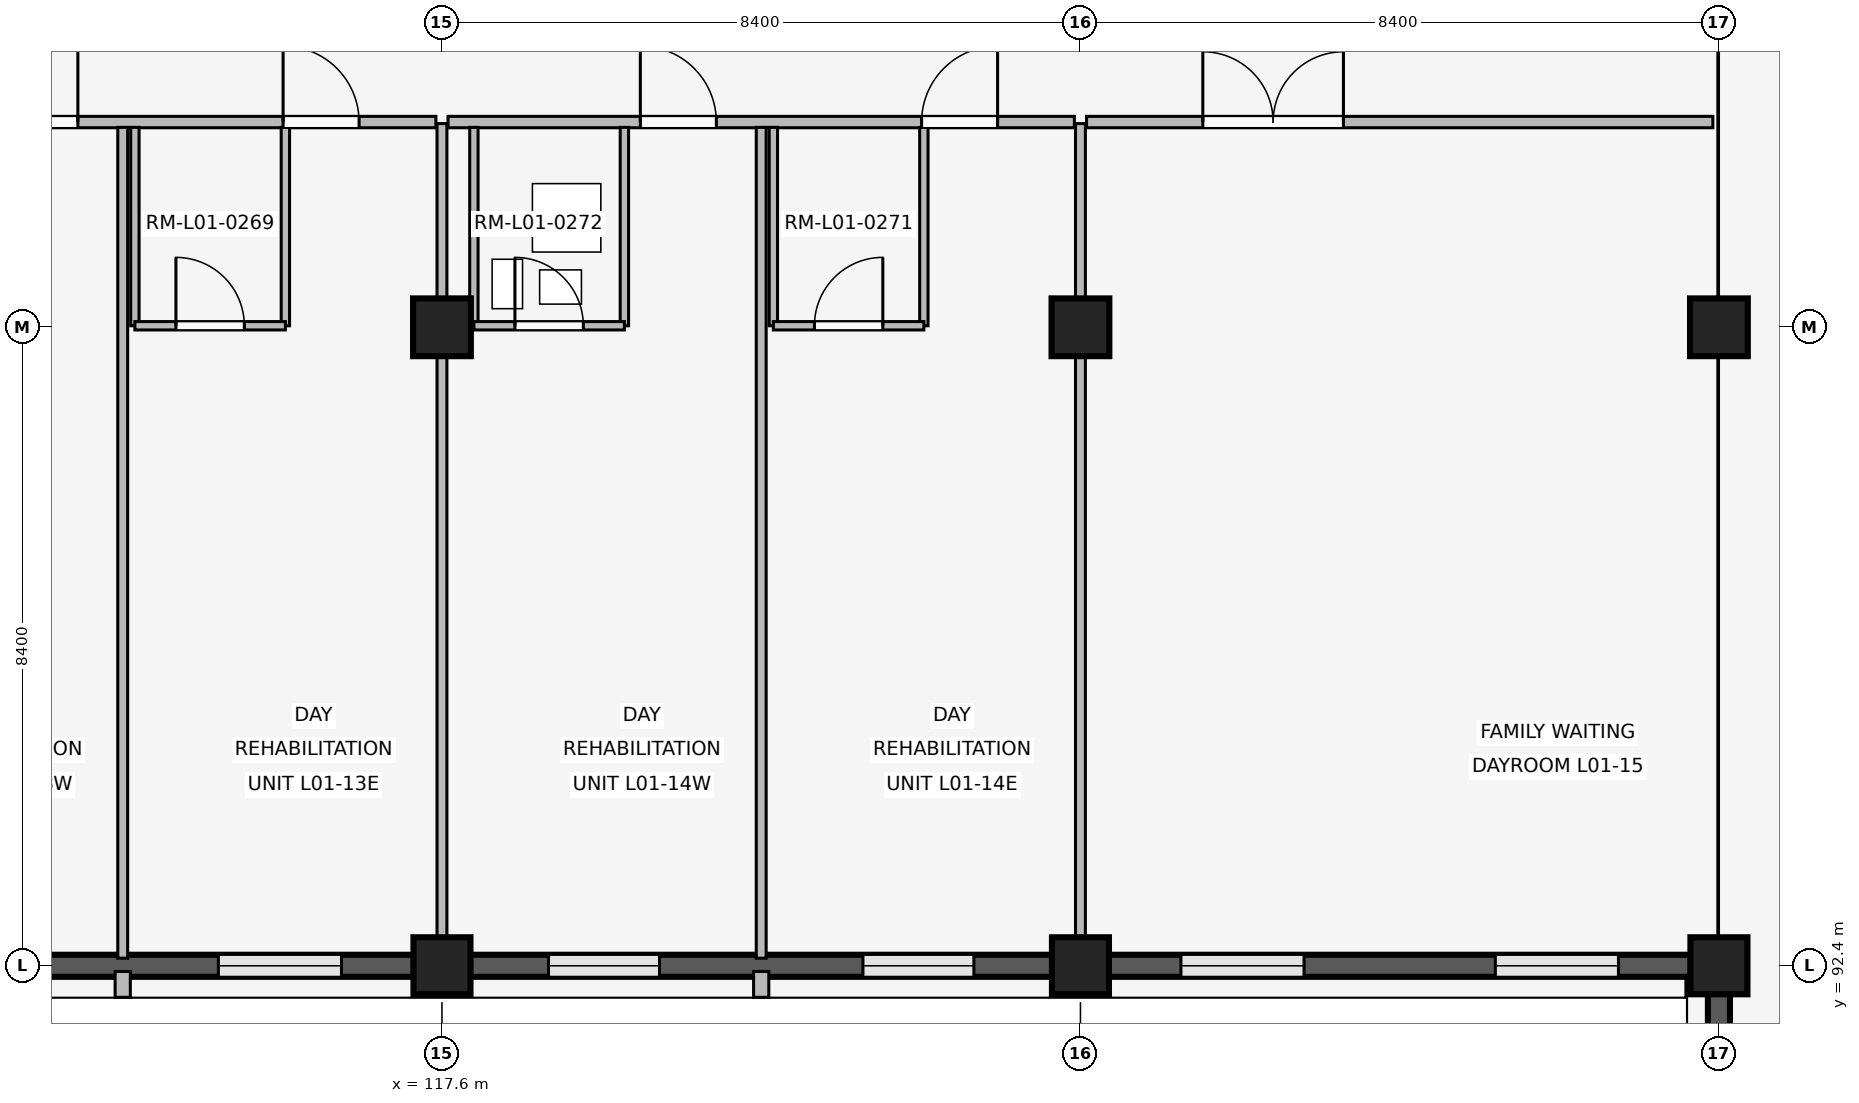
"""IFC4 building model, lengths in metres.
Left out: names, types, materials, properties, quantities, classifications, styles, units other than length and angle.
Written with IfcOpenShell. Run it as: python <this file> out.ifc"""

import sys

from ifc_helpers import new_model, si_unit, direction, frame, frame_2d, origin, origin_2d, place, context, subcontext, project, spatial, rectangle, extrude, element, fill, save


model = new_model("IFC4")
c1 = context("Model", 3, precision=1e-05, world=origin(), true_north=direction((0.0, 1.0)))
c2 = subcontext(c1, "Body", "Model", "MODEL_VIEW")
j1 = project(units=[si_unit("LENGTHUNIT", "METRE"), si_unit("PLANEANGLEUNIT", "RADIAN")], contexts=[c1])
p1 = place(None, origin())
s1 = spatial("IfcSite", under=j1, at=p1, CompositionType="ELEMENT")
p2 = place(p1, origin())
s2 = spatial("IfcBuilding", under=s1, at=p2, CompositionType="ELEMENT")
p3 = place(p2, frame((0.0, 0.0, 4.8)))
s3 = spatial("IfcBuildingStorey", under=s2, at=p3, CompositionType="ELEMENT", Elevation=4.8)
p4 = place(p3, frame((117.6, 92.4, 0.0), z_axis=(0.0, 0.0, 1.0), x_axis=(1.0, 0.0, 0.0)))
e1 = element("IfcColumn", 1, at=p4, inside=s3, PredefinedType="COLUMN", context=c2, shape_type="SweptSolid", body=[
    extrude(rectangle(XDim=0.75, YDim=0.75, at=origin_2d()), origin(), (0.0, 0.0, 1.0), 3.3),
])
p5 = place(p3, frame((117.6, 100.8, 0.0), z_axis=(0.0, 0.0, 1.0), x_axis=(1.0, 0.0, 0.0)))
e2 = element("IfcColumn", 2, at=p5, inside=s3, PredefinedType="COLUMN", context=c2, shape_type="SweptSolid", body=[
    extrude(rectangle(XDim=0.76, YDim=0.76, at=origin_2d()), origin(), (0.0, 0.0, 1.0), 3.3),
])
p6 = place(p3, frame((126.0, 92.4, 0.0), z_axis=(0.0, 0.0, 1.0), x_axis=(1.0, 0.0, 0.0)))
e3 = element("IfcColumn", 3, at=p6, inside=s3, PredefinedType="COLUMN", context=c2, shape_type="SweptSolid", body=[
    extrude(rectangle(XDim=0.75, YDim=0.75, at=origin_2d()), origin(), (0.0, 0.0, 1.0), 3.3),
])
p7 = place(p3, frame((126.0, 100.8, 0.0), z_axis=(0.0, 0.0, 1.0), x_axis=(1.0, 0.0, 0.0)))
e4 = element("IfcColumn", 4, at=p7, inside=s3, PredefinedType="COLUMN", context=c2, shape_type="SweptSolid", body=[
    extrude(rectangle(XDim=0.76, YDim=0.76, at=origin_2d()), origin(), (0.0, 0.0, 1.0), 3.3),
])
p8 = place(p3, frame((134.4, 92.4, 0.0), z_axis=(0.0, 0.0, 1.0), x_axis=(1.0, 0.0, 0.0)))
e5 = element("IfcColumn", 5, at=p8, inside=s3, PredefinedType="COLUMN", context=c2, shape_type="SweptSolid", body=[
    extrude(rectangle(XDim=0.75, YDim=0.75, at=origin_2d()), origin(), (0.0, 0.0, 1.0), 3.3),
])
p9 = place(p3, frame((134.4, 100.8, 0.0), z_axis=(0.0, 0.0, 1.0), x_axis=(1.0, 0.0, 0.0)))
e6 = element("IfcColumn", 6, at=p9, inside=s3, PredefinedType="COLUMN", context=c2, shape_type="SweptSolid", body=[
    extrude(rectangle(XDim=0.76, YDim=0.76, at=origin_2d()), origin(), (0.0, 0.0, 1.0), 3.3),
])
p10 = place(p3, frame((117.23, 92.4, 0.0), z_axis=(0.0, 0.0, 1.0), x_axis=(-1.0, 0.0, 0.0)))
e7 = element("IfcWall", 7, at=p10, inside=s3, PredefinedType="SOLIDWALL", context=c2, shape_type="SweptSolid", body=[
    extrude(rectangle(XDim=7.66, YDim=0.29, at=frame_2d((3.83, 0.0))), origin(), (0.0, 0.0, 1.0), 2.42),
])
p11 = place(p10, frame((0.952, 0.0, 0.85)))
e8 = element("IfcOpeningElement", 8, at=p11, cuts=e7, PredefinedType="OPENING", context=c2, shape_type="SweptSolid", body=[
    extrude(rectangle(XDim=1.62, YDim=0.95, at=frame_2d((0.81, 0.475))), frame((0.0, 0.155, 0.0), z_axis=(0.0, -1.0, 0.0), x_axis=(1.0, 0.0, 0.0)), (0.0, 0.0, 1.0), 0.31),
])
p12 = place(p10, frame((5.088, 0.0, 0.85)))
e9 = element("IfcOpeningElement", 9, at=p12, cuts=e7, PredefinedType="OPENING", context=c2, shape_type="SweptSolid", body=[
    extrude(rectangle(XDim=1.62, YDim=0.95, at=frame_2d((0.81, 0.475))), frame((0.0, 0.155, 0.0), z_axis=(0.0, -1.0, 0.0), x_axis=(1.0, 0.0, 0.0)), (0.0, 0.0, 1.0), 0.31),
])
p13 = place(p3, frame((113.4, 92.325, 0.0), z_axis=(0.0, 0.0, 1.0), x_axis=(0.0, -1.0, 0.0)))
e10 = element("IfcWall", 10, at=p13, inside=s3, PredefinedType="ELEMENTEDWALL", context=c2, shape_type="SweptSolid", body=[
    extrude(rectangle(XDim=0.34, YDim=0.2, at=frame_2d((0.17, 0.0))), origin(), (0.0, 0.0, 1.0), 2.4),
])
p14 = place(p3, frame((125.63, 92.4, 0.0), z_axis=(0.0, 0.0, 1.0), x_axis=(-1.0, 0.0, 0.0)))
e11 = element("IfcWall", 11, at=p14, inside=s3, PredefinedType="SOLIDWALL", context=c2, shape_type="SweptSolid", body=[
    extrude(rectangle(XDim=7.66, YDim=0.29, at=frame_2d((3.83, 0.0))), origin(), (0.0, 0.0, 1.0), 2.42),
])
p15 = place(p14, frame((1.032, 0.0, 0.85)))
e12 = element("IfcOpeningElement", 12, at=p15, cuts=e11, PredefinedType="OPENING", context=c2, shape_type="SweptSolid", body=[
    extrude(rectangle(XDim=1.46, YDim=0.85, at=frame_2d((0.73, 0.425))), frame((0.0, 0.155, 0.0), z_axis=(0.0, -1.0, 0.0), x_axis=(1.0, 0.0, 0.0)), (0.0, 0.0, 1.0), 0.31),
])
p16 = place(p14, frame((5.168, 0.0, 0.85)))
e13 = element("IfcOpeningElement", 13, at=p16, cuts=e11, PredefinedType="OPENING", context=c2, shape_type="SweptSolid", body=[
    extrude(rectangle(XDim=1.46, YDim=0.85, at=frame_2d((0.73, 0.425))), frame((0.0, 0.155, 0.0), z_axis=(0.0, -1.0, 0.0), x_axis=(1.0, 0.0, 0.0)), (0.0, 0.0, 1.0), 0.31),
])
p17 = place(p3, frame((121.8, 92.325, 0.0), z_axis=(0.0, 0.0, 1.0), x_axis=(0.0, -1.0, 0.0)))
e14 = element("IfcWall", 14, at=p17, inside=s3, PredefinedType="ELEMENTEDWALL", context=c2, shape_type="SweptSolid", body=[
    extrude(rectangle(XDim=0.34, YDim=0.2, at=frame_2d((0.17, 0.0))), origin(), (0.0, 0.0, 1.0), 2.4),
])
p18 = place(p3, frame((134.03, 92.4, 0.0), z_axis=(0.0, 0.0, 1.0), x_axis=(-1.0, 0.0, 0.0)))
e15 = element("IfcWall", 15, at=p18, inside=s3, PredefinedType="SOLIDWALL", context=c2, shape_type="SweptSolid", body=[
    extrude(rectangle(XDim=7.66, YDim=0.29, at=frame_2d((3.83, 0.0))), origin(), (0.0, 0.0, 1.0), 2.42),
])
p19 = place(p18, frame((0.952, 0.0, 0.85)))
e16 = element("IfcOpeningElement", 16, at=p19, cuts=e15, PredefinedType="OPENING", context=c2, shape_type="SweptSolid", body=[
    extrude(rectangle(XDim=1.62, YDim=0.95, at=frame_2d((0.81, 0.475))), frame((0.0, 0.155, 0.0), z_axis=(0.0, -1.0, 0.0), x_axis=(1.0, 0.0, 0.0)), (0.0, 0.0, 1.0), 0.31),
])
p20 = place(p18, frame((5.088, 0.0, 0.85)))
e17 = element("IfcOpeningElement", 17, at=p20, cuts=e15, PredefinedType="OPENING", context=c2, shape_type="SweptSolid", body=[
    extrude(rectangle(XDim=1.62, YDim=0.95, at=frame_2d((0.81, 0.475))), frame((0.0, 0.155, 0.0), z_axis=(0.0, -1.0, 0.0), x_axis=(1.0, 0.0, 0.0)), (0.0, 0.0, 1.0), 0.31),
])
p21 = place(p3, frame((134.4, 84.37, 0.0), z_axis=(0.0, 0.0, 1.0), x_axis=(0.0, 1.0, 0.0)))
e18 = element("IfcWall", 18, at=p21, inside=s3, PredefinedType="SOLIDWALL", context=c2, shape_type="SweptSolid", body=[
    extrude(rectangle(XDim=7.66, YDim=0.29, at=frame_2d((3.83, 0.0))), origin(), (0.0, 0.0, 1.0), 2.42),
])
p22 = place(p21, frame((1.088, 0.0, 1.05)))
e19 = element("IfcOpeningElement", 19, at=p22, cuts=e18, PredefinedType="OPENING", context=c2, shape_type="SweptSolid", body=[
    extrude(rectangle(XDim=1.5, YDim=0.75, at=frame_2d((0.75, 0.375))), frame((0.0, 0.155, 0.0), z_axis=(0.0, -1.0, 0.0), x_axis=(1.0, 0.0, 0.0)), (0.0, 0.0, 1.0), 0.31),
])
p23 = place(p21, frame((5.072, 0.0, 1.05)))
e20 = element("IfcOpeningElement", 20, at=p23, cuts=e18, PredefinedType="OPENING", context=c2, shape_type="SweptSolid", body=[
    extrude(rectangle(XDim=1.5, YDim=0.75, at=frame_2d((0.75, 0.375))), frame((0.0, 0.155, 0.0), z_axis=(0.0, -1.0, 0.0), x_axis=(1.0, 0.0, 0.0)), (0.0, 0.0, 1.0), 0.31),
])
p24 = place(p3, frame((109.28, 103.5, 0.0), z_axis=(0.0, 0.0, 1.0), x_axis=(1.0, 0.0, 0.0)))
e21 = element("IfcWall", 21, at=p24, inside=s3, PredefinedType="PARTITIONING", context=c2, shape_type="SweptSolid", body=[
    extrude(rectangle(XDim=8.24, YDim=0.15, at=frame_2d((4.12, 0.0))), origin(), (0.0, 0.0, 1.0), 2.4),
])
p25 = place(p24, frame((2.53, 0.0, 0.0)))
e22 = element("IfcOpeningElement", 22, at=p25, cuts=e21, PredefinedType="OPENING", context=c2, shape_type="SweptSolid", body=[
    extrude(rectangle(XDim=1.0, YDim=2.15, at=frame_2d((0.5, 1.075))), frame((0.0, 0.085, 0.0), z_axis=(0.0, -1.0, 0.0), x_axis=(1.0, 0.0, 0.0)), (0.0, 0.0, 1.0), 0.17),
])
p26 = place(p24, frame((6.23, 0.0, 0.0)))
e23 = element("IfcOpeningElement", 23, at=p26, cuts=e21, PredefinedType="OPENING", context=c2, shape_type="SweptSolid", body=[
    extrude(rectangle(XDim=1.0, YDim=2.15, at=frame_2d((0.5, 1.075))), frame((0.0, 0.085, 0.0), z_axis=(0.0, -1.0, 0.0), x_axis=(1.0, 0.0, 0.0)), (0.0, 0.0, 1.0), 0.17),
])
p27 = place(p3, frame((113.4, 92.5, 0.0), z_axis=(0.0, 0.0, 1.0), x_axis=(0.0, 1.0, 0.0)))
e24 = element("IfcWall", 24, at=p27, inside=s3, PredefinedType="PARTITIONING", context=c2, shape_type="SweptSolid", body=[
    extrude(rectangle(XDim=10.93, YDim=0.13, at=frame_2d((5.465, 0.0))), origin(), (0.0, 0.0, 1.0), 2.4),
])
for number, where, z_axis, x_axis in (
    (25, (113.56, 100.82, 0.0), (0.0, 0.0, 1.0), (0.0, 1.0, 0.0)),
    (26, (115.54, 100.82, 0.0), (0.0, 0.0, 1.0), (0.0, 1.0, 0.0)),
):
    element("IfcWall", number, at=place(p3, frame(where, z_axis=z_axis, x_axis=x_axis)), inside=s3, PredefinedType="PARTITIONING", context=c2, shape_type="SweptSolid", body=[
        extrude(rectangle(XDim=2.61, YDim=0.11, at=frame_2d((1.305, 0.0))), origin(), (0.0, 0.0, 1.0), 2.4),
    ])
p28 = place(p3, frame((113.56, 100.82, 0.0), z_axis=(0.0, 0.0, 1.0), x_axis=(1.0, 0.0, 0.0)))
e27 = element("IfcWall", 27, at=p28, inside=s3, PredefinedType="PARTITIONING", context=c2, shape_type="SweptSolid", body=[
    extrude(rectangle(XDim=1.98, YDim=0.11, at=frame_2d((0.99, 0.0))), origin(), (0.0, 0.0, 1.0), 2.4),
])
p29 = place(p28, frame((0.54, 0.0, 0.0)))
e28 = element("IfcOpeningElement", 28, at=p29, cuts=e27, PredefinedType="OPENING", context=c2, shape_type="SweptSolid", body=[
    extrude(rectangle(XDim=0.9, YDim=2.1, at=frame_2d((0.45, 1.05))), frame((0.0, 0.065, 0.0), z_axis=(0.0, -1.0, 0.0), x_axis=(1.0, 0.0, 0.0)), (0.0, 0.0, 1.0), 0.13),
])
p30 = place(p3, frame((117.6, 92.54, 0.0), z_axis=(0.0, 0.0, 1.0), x_axis=(0.0, 1.0, 0.0)))
e29 = element("IfcWall", 29, at=p30, inside=s3, PredefinedType="PARTITIONING", context=c2, shape_type="SweptSolid", body=[
    extrude(rectangle(XDim=10.94, YDim=0.13, at=frame_2d((5.47, 0.0))), origin(), (0.0, 0.0, 1.0), 2.4),
])
p31 = place(p3, frame((117.68, 103.5, 0.0), z_axis=(0.0, 0.0, 1.0), x_axis=(1.0, 0.0, 0.0)))
e30 = element("IfcWall", 30, at=p31, inside=s3, PredefinedType="PARTITIONING", context=c2, shape_type="SweptSolid", body=[
    extrude(rectangle(XDim=8.24, YDim=0.15, at=frame_2d((4.12, 0.0))), origin(), (0.0, 0.0, 1.0), 2.4),
])
p32 = place(p31, frame((2.53, 0.0, 0.0)))
e31 = element("IfcOpeningElement", 31, at=p32, cuts=e30, PredefinedType="OPENING", context=c2, shape_type="SweptSolid", body=[
    extrude(rectangle(XDim=1.0, YDim=2.15, at=frame_2d((0.5, 1.075))), frame((0.0, 0.085, 0.0), z_axis=(0.0, -1.0, 0.0), x_axis=(1.0, 0.0, 0.0)), (0.0, 0.0, 1.0), 0.17),
])
p33 = place(p31, frame((6.23, 0.0, 0.0)))
e32 = element("IfcOpeningElement", 32, at=p33, cuts=e30, PredefinedType="OPENING", context=c2, shape_type="SweptSolid", body=[
    extrude(rectangle(XDim=1.0, YDim=2.15, at=frame_2d((0.5, 1.075))), frame((0.0, 0.085, 0.0), z_axis=(0.0, -1.0, 0.0), x_axis=(1.0, 0.0, 0.0)), (0.0, 0.0, 1.0), 0.17),
])
p34 = place(p3, frame((121.8, 92.5, 0.0), z_axis=(0.0, 0.0, 1.0), x_axis=(0.0, 1.0, 0.0)))
e33 = element("IfcWall", 33, at=p34, inside=s3, PredefinedType="PARTITIONING", context=c2, shape_type="SweptSolid", body=[
    extrude(rectangle(XDim=10.93, YDim=0.13, at=frame_2d((5.465, 0.0))), origin(), (0.0, 0.0, 1.0), 2.4),
])
for number, where, z_axis, x_axis in (
    (34, (118.02, 100.82, 0.0), (0.0, 0.0, 1.0), (0.0, 1.0, 0.0)),
    (35, (120.0, 100.82, 0.0), (0.0, 0.0, 1.0), (0.0, 1.0, 0.0)),
):
    element("IfcWall", number, at=place(p3, frame(where, z_axis=z_axis, x_axis=x_axis)), inside=s3, PredefinedType="PARTITIONING", context=c2, shape_type="SweptSolid", body=[
        extrude(rectangle(XDim=2.61, YDim=0.11, at=frame_2d((1.305, 0.0))), origin(), (0.0, 0.0, 1.0), 2.4),
    ])
p35 = place(p3, frame((118.02, 100.82, 0.0), z_axis=(0.0, 0.0, 1.0), x_axis=(1.0, 0.0, 0.0)))
e36 = element("IfcWall", 36, at=p35, inside=s3, PredefinedType="PARTITIONING", context=c2, shape_type="SweptSolid", body=[
    extrude(rectangle(XDim=1.98, YDim=0.11, at=frame_2d((0.99, 0.0))), origin(), (0.0, 0.0, 1.0), 2.4),
])
p36 = place(p35, frame((0.54, 0.0, 0.0)))
e37 = element("IfcOpeningElement", 37, at=p36, cuts=e36, PredefinedType="OPENING", context=c2, shape_type="SweptSolid", body=[
    extrude(rectangle(XDim=0.9, YDim=2.1, at=frame_2d((0.45, 1.05))), frame((0.0, 0.065, 0.0), z_axis=(0.0, -1.0, 0.0), x_axis=(1.0, 0.0, 0.0)), (0.0, 0.0, 1.0), 0.13),
])
for number, where, z_axis, x_axis in (
    (38, (121.96, 100.82, 0.0), (0.0, 0.0, 1.0), (0.0, 1.0, 0.0)),
    (39, (123.94, 100.82, 0.0), (0.0, 0.0, 1.0), (0.0, 1.0, 0.0)),
):
    element("IfcWall", number, at=place(p3, frame(where, z_axis=z_axis, x_axis=x_axis)), inside=s3, PredefinedType="PARTITIONING", context=c2, shape_type="SweptSolid", body=[
        extrude(rectangle(XDim=2.61, YDim=0.11, at=frame_2d((1.305, 0.0))), origin(), (0.0, 0.0, 1.0), 2.4),
    ])
p37 = place(p3, frame((121.96, 100.82, 0.0), z_axis=(0.0, 0.0, 1.0), x_axis=(1.0, 0.0, 0.0)))
e40 = element("IfcWall", 40, at=p37, inside=s3, PredefinedType="PARTITIONING", context=c2, shape_type="SweptSolid", body=[
    extrude(rectangle(XDim=1.98, YDim=0.11, at=frame_2d((0.99, 0.0))), origin(), (0.0, 0.0, 1.0), 2.4),
])
p38 = place(p37, frame((0.54, 0.0, 0.0)))
e41 = element("IfcOpeningElement", 41, at=p38, cuts=e40, PredefinedType="OPENING", context=c2, shape_type="SweptSolid", body=[
    extrude(rectangle(XDim=0.9, YDim=2.1, at=frame_2d((0.45, 1.05))), frame((0.0, 0.065, 0.0), z_axis=(0.0, -1.0, 0.0), x_axis=(1.0, 0.0, 0.0)), (0.0, 0.0, 1.0), 0.13),
])
p39 = place(p3, frame((126.0, 92.54, 0.0), z_axis=(0.0, 0.0, 1.0), x_axis=(0.0, 1.0, 0.0)))
e42 = element("IfcWall", 42, at=p39, inside=s3, PredefinedType="PARTITIONING", context=c2, shape_type="SweptSolid", body=[
    extrude(rectangle(XDim=10.94, YDim=0.13, at=frame_2d((5.47, 0.0))), origin(), (0.0, 0.0, 1.0), 2.4),
])
p40 = place(p3, frame((126.08, 103.5, 0.0), z_axis=(0.0, 0.0, 1.0), x_axis=(1.0, 0.0, 0.0)))
e43 = element("IfcWall", 43, at=p40, inside=s3, PredefinedType="PARTITIONING", context=c2, shape_type="SweptSolid", body=[
    extrude(rectangle(XDim=8.24, YDim=0.15, at=frame_2d((4.12, 0.0))), origin(), (0.0, 0.0, 1.0), 2.4),
])
p41 = place(p40, frame((1.53, 0.0, 0.0)))
e44 = element("IfcOpeningElement", 44, at=p41, cuts=e43, PredefinedType="OPENING", context=c2, shape_type="SweptSolid", body=[
    extrude(rectangle(XDim=1.85, YDim=2.3, at=frame_2d((0.925, 1.15))), frame((0.0, 0.085, 0.0), z_axis=(0.0, -1.0, 0.0), x_axis=(1.0, 0.0, 0.0)), (0.0, 0.0, 1.0), 0.17),
])
p42 = place(p11, origin())
e45 = element("IfcWindow", 45, at=p42, inside=s3, PartitioningType="SINGLE_PANEL", PredefinedType="WINDOW", context=c2, shape_type="SweptSolid", body=[
    extrude(rectangle(XDim=1.62, YDim=0.95, at=frame_2d((0.81, 0.475))), frame((0.0, 0.03, 0.0), z_axis=(0.0, -1.0, 0.0), x_axis=(1.0, 0.0, 0.0)), (0.0, 0.0, 1.0), 0.06),
])
fill(e8, e45)
p43 = place(p15, origin())
e46 = element("IfcWindow", 46, at=p43, inside=s3, PartitioningType="SINGLE_PANEL", PredefinedType="WINDOW", context=c2, shape_type="SweptSolid", body=[
    extrude(rectangle(XDim=1.46, YDim=0.85, at=frame_2d((0.73, 0.425))), frame((0.0, 0.03, 0.0), z_axis=(0.0, -1.0, 0.0), x_axis=(1.0, 0.0, 0.0)), (0.0, 0.0, 1.0), 0.06),
])
fill(e12, e46)
p44 = place(p16, origin())
e47 = element("IfcWindow", 47, at=p44, inside=s3, PartitioningType="SINGLE_PANEL", PredefinedType="WINDOW", context=c2, shape_type="SweptSolid", body=[
    extrude(rectangle(XDim=1.46, YDim=0.85, at=frame_2d((0.73, 0.425))), frame((0.0, 0.03, 0.0), z_axis=(0.0, -1.0, 0.0), x_axis=(1.0, 0.0, 0.0)), (0.0, 0.0, 1.0), 0.06),
])
fill(e13, e47)
p45 = place(p19, origin())
e48 = element("IfcWindow", 48, at=p45, inside=s3, PartitioningType="SINGLE_PANEL", PredefinedType="WINDOW", context=c2, shape_type="SweptSolid", body=[
    extrude(rectangle(XDim=1.62, YDim=0.95, at=frame_2d((0.81, 0.475))), frame((0.0, 0.03, 0.0), z_axis=(0.0, -1.0, 0.0), x_axis=(1.0, 0.0, 0.0)), (0.0, 0.0, 1.0), 0.06),
])
fill(e16, e48)
p46 = place(p20, origin())
e49 = element("IfcWindow", 49, at=p46, inside=s3, PartitioningType="SINGLE_PANEL", PredefinedType="WINDOW", context=c2, shape_type="SweptSolid", body=[
    extrude(rectangle(XDim=1.62, YDim=0.95, at=frame_2d((0.81, 0.475))), frame((0.0, 0.03, 0.0), z_axis=(0.0, -1.0, 0.0), x_axis=(1.0, 0.0, 0.0)), (0.0, 0.0, 1.0), 0.06),
])
fill(e17, e49)
p47 = place(p25, origin())
e50 = element("IfcDoor", 50, at=p47, inside=s3, OperationType="SINGLE_SWING_RIGHT", PredefinedType="DOOR", context=c2, shape_type="SweptSolid", body=[
    extrude(rectangle(XDim=1.0, YDim=2.15, at=frame_2d((0.5, 1.075))), frame((0.0, 0.025, 0.0), z_axis=(0.0, -1.0, 0.0), x_axis=(1.0, 0.0, 0.0)), (0.0, 0.0, 1.0), 0.05),
])
fill(e22, e50)
p48 = place(p26, origin())
e51 = element("IfcDoor", 51, at=p48, inside=s3, OperationType="SINGLE_SWING_LEFT", PredefinedType="DOOR", context=c2, shape_type="SweptSolid", body=[
    extrude(rectangle(XDim=1.0, YDim=2.15, at=frame_2d((0.5, 1.075))), frame((0.0, 0.025, 0.0), z_axis=(0.0, -1.0, 0.0), x_axis=(1.0, 0.0, 0.0)), (0.0, 0.0, 1.0), 0.05),
])
fill(e23, e51)
p49 = place(p29, origin())
e52 = element("IfcDoor", 52, at=p49, inside=s3, OperationType="SINGLE_SWING_LEFT", PredefinedType="DOOR", context=c2, shape_type="SweptSolid", body=[
    extrude(rectangle(XDim=0.9, YDim=2.1, at=frame_2d((0.45, 1.05))), frame((0.0, 0.025, 0.0), z_axis=(0.0, -1.0, 0.0), x_axis=(1.0, 0.0, 0.0)), (0.0, 0.0, 1.0), 0.05),
])
fill(e28, e52)
p50 = place(p32, origin())
e53 = element("IfcDoor", 53, at=p50, inside=s3, OperationType="SINGLE_SWING_LEFT", PredefinedType="DOOR", context=c2, shape_type="SweptSolid", body=[
    extrude(rectangle(XDim=1.0, YDim=2.15, at=frame_2d((0.5, 1.075))), frame((0.0, 0.025, 0.0), z_axis=(0.0, -1.0, 0.0), x_axis=(1.0, 0.0, 0.0)), (0.0, 0.0, 1.0), 0.05),
])
fill(e31, e53)
p51 = place(p33, origin())
e54 = element("IfcDoor", 54, at=p51, inside=s3, OperationType="SINGLE_SWING_RIGHT", PredefinedType="DOOR", context=c2, shape_type="SweptSolid", body=[
    extrude(rectangle(XDim=1.0, YDim=2.15, at=frame_2d((0.5, 1.075))), frame((0.0, 0.025, 0.0), z_axis=(0.0, -1.0, 0.0), x_axis=(1.0, 0.0, 0.0)), (0.0, 0.0, 1.0), 0.05),
])
fill(e32, e54)
p52 = place(p36, origin())
e55 = element("IfcDoor", 55, at=p52, inside=s3, OperationType="SINGLE_SWING_LEFT", PredefinedType="DOOR", context=c2, shape_type="SweptSolid", body=[
    extrude(rectangle(XDim=0.9, YDim=2.1, at=frame_2d((0.45, 1.05))), frame((0.0, 0.025, 0.0), z_axis=(0.0, -1.0, 0.0), x_axis=(1.0, 0.0, 0.0)), (0.0, 0.0, 1.0), 0.05),
])
fill(e37, e55)
p53 = place(p38, origin())
e56 = element("IfcDoor", 56, at=p53, inside=s3, OperationType="SINGLE_SWING_RIGHT", PredefinedType="DOOR", context=c2, shape_type="SweptSolid", body=[
    extrude(rectangle(XDim=0.9, YDim=2.1, at=frame_2d((0.45, 1.05))), frame((0.0, 0.025, 0.0), z_axis=(0.0, -1.0, 0.0), x_axis=(1.0, 0.0, 0.0)), (0.0, 0.0, 1.0), 0.05),
])
fill(e41, e56)
p54 = place(p41, origin())
e57 = element("IfcDoor", 57, at=p54, inside=s3, OperationType="DOUBLE_SWING_LEFT", PredefinedType="DOOR", context=c2, shape_type="SweptSolid", body=[
    extrude(rectangle(XDim=1.85, YDim=2.3, at=frame_2d((0.925, 1.15))), frame((0.0, 0.025, 0.0), z_axis=(0.0, -1.0, 0.0), x_axis=(1.0, 0.0, 0.0)), (0.0, 0.0, 1.0), 0.05),
])
fill(e44, e57)
save(model, sys.argv[1])
